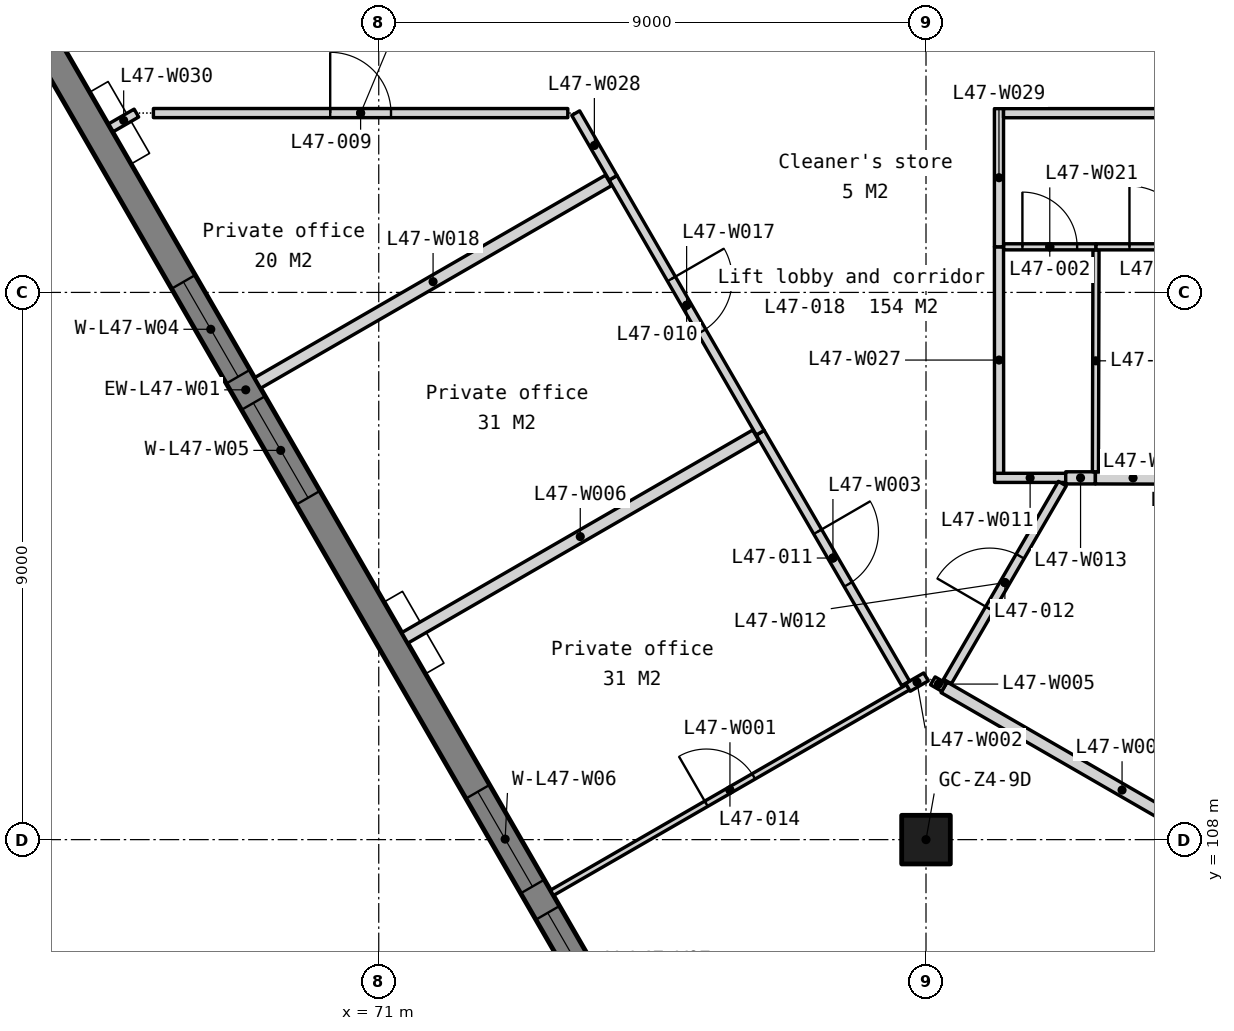
"""IFC4 building model, lengths in metres.
Left out: names, types, materials, properties, quantities, classifications, styles, units other than length and angle.
Written with IfcOpenShell. Run it as: python <this file> out.ifc"""

import sys

from ifc_helpers import new_model, si_unit, direction, frame, frame_2d, origin, origin_2d, place, context, subcontext, project, spatial, polyline, rectangle, outline, extrude, element, fill, save


model = new_model("IFC4")
c1 = context("Model", 3, precision=1e-05, world=origin(), true_north=direction((0.0, 1.0)))
c2 = subcontext(c1, "Body", "Model", "MODEL_VIEW")
j1 = project(units=[si_unit("LENGTHUNIT", "METRE"), si_unit("PLANEANGLEUNIT", "RADIAN")], contexts=[c1])
p1 = place(None, origin())
s1 = spatial("IfcSite", under=j1, at=p1, CompositionType="ELEMENT")
p2 = place(p1, origin())
s2 = spatial("IfcBuilding", under=s1, at=p2, CompositionType="ELEMENT")
p3 = place(p2, frame((0.0, 0.0, 188.0)))
s3 = spatial("IfcBuildingStorey", under=s2, at=p3, CompositionType="ELEMENT", Elevation=188.0)
p4 = place(p3, frame((80.0, 108.0, 0.0), z_axis=(0.0, 0.0, 1.0), x_axis=(1.0, 0.0, 0.0)))
e1 = element("IfcColumn", 1, at=p4, inside=s3, PredefinedType="COLUMN", context=c2, shape_type="SweptSolid", body=[
    extrude(rectangle(XDim=0.8, YDim=0.8, at=origin_2d()), origin(), (0.0, 0.0, 1.0), 3.9),
])
p5 = place(p3, frame((59.13, 132.168, -0.15), z_axis=(0.0, 0.0, 1.0), x_axis=(0.500002199942, -0.866024133644, 0.0)))
e2 = element("IfcWall", 2, at=p5, inside=s3, PredefinedType="SOLIDWALL", context=c2, shape_type="SweptSolid", body=[
    extrude(outline(polyline([(38.729, 0.0), (38.729, 3.9), (0.0, 3.9), (0.0, 0.0), (38.729, 0.0)])), frame((0.0, 0.225, 0.0), z_axis=(0.0, -1.0, 0.0), x_axis=(1.0, 0.0, 0.0)), (0.0, 0.0, 1.0), 0.45),
])
p6 = place(p5, frame((0.807, 0.0, 0.95)))
e3 = element("IfcOpeningElement", 3, at=p6, cuts=e2, PredefinedType="OPENING", context=c2, shape_type="SweptSolid", body=[
    extrude(rectangle(XDim=1.2, YDim=2.2, at=frame_2d((0.6, 1.1))), frame((0.0, 0.235, 0.0), z_axis=(0.0, -1.0, 0.0), x_axis=(1.0, 0.0, 0.0)), (0.0, 0.0, 1.0), 0.47),
])
p7 = place(p5, frame((7.632, 0.0, 0.95)))
e4 = element("IfcOpeningElement", 4, at=p7, cuts=e2, PredefinedType="OPENING", context=c2, shape_type="SweptSolid", body=[
    extrude(rectangle(XDim=1.8, YDim=2.2, at=frame_2d((0.9, 1.1))), frame((0.0, 0.235, 0.0), z_axis=(0.0, -1.0, 0.0), x_axis=(1.0, 0.0, 0.0)), (0.0, 0.0, 1.0), 0.47),
])
p8 = place(p5, frame((9.932, 0.0, 0.95)))
e5 = element("IfcOpeningElement", 5, at=p8, cuts=e2, PredefinedType="OPENING", context=c2, shape_type="SweptSolid", body=[
    extrude(rectangle(XDim=1.8, YDim=2.2, at=frame_2d((0.9, 1.1))), frame((0.0, 0.235, 0.0), z_axis=(0.0, -1.0, 0.0), x_axis=(1.0, 0.0, 0.0)), (0.0, 0.0, 1.0), 0.47),
])
p9 = place(p5, frame((17.315, 0.0, 0.95)))
e6 = element("IfcOpeningElement", 6, at=p9, cuts=e2, PredefinedType="OPENING", context=c2, shape_type="SweptSolid", body=[
    extrude(rectangle(XDim=1.8, YDim=2.2, at=frame_2d((0.9, 1.1))), frame((0.0, 0.235, 0.0), z_axis=(0.0, -1.0, 0.0), x_axis=(1.0, 0.0, 0.0)), (0.0, 0.0, 1.0), 0.47),
])
p10 = place(p5, frame((19.615, 0.0, 0.95)))
e7 = element("IfcOpeningElement", 7, at=p10, cuts=e2, PredefinedType="OPENING", context=c2, shape_type="SweptSolid", body=[
    extrude(rectangle(XDim=1.8, YDim=2.2, at=frame_2d((0.9, 1.1))), frame((0.0, 0.235, 0.0), z_axis=(0.0, -1.0, 0.0), x_axis=(1.0, 0.0, 0.0)), (0.0, 0.0, 1.0), 0.47),
])
p11 = place(p5, frame((26.997, 0.0, 0.95)))
e8 = element("IfcOpeningElement", 8, at=p11, cuts=e2, PredefinedType="OPENING", context=c2, shape_type="SweptSolid", body=[
    extrude(rectangle(XDim=1.8, YDim=2.2, at=frame_2d((0.9, 1.1))), frame((0.0, 0.235, 0.0), z_axis=(0.0, -1.0, 0.0), x_axis=(1.0, 0.0, 0.0)), (0.0, 0.0, 1.0), 0.47),
])
p12 = place(p5, frame((29.297, 0.0, 0.95)))
e9 = element("IfcOpeningElement", 9, at=p12, cuts=e2, PredefinedType="OPENING", context=c2, shape_type="SweptSolid", body=[
    extrude(rectangle(XDim=1.8, YDim=2.2, at=frame_2d((0.9, 1.1))), frame((0.0, 0.235, 0.0), z_axis=(0.0, -1.0, 0.0), x_axis=(1.0, 0.0, 0.0)), (0.0, 0.0, 1.0), 0.47),
])
p13 = place(p5, frame((36.722, 0.0, 0.95)))
e10 = element("IfcOpeningElement", 10, at=p13, cuts=e2, PredefinedType="OPENING", context=c2, shape_type="SweptSolid", body=[
    extrude(rectangle(XDim=1.2, YDim=2.2, at=frame_2d((0.6, 1.1))), frame((0.0, 0.235, 0.0), z_axis=(0.0, -1.0, 0.0), x_axis=(1.0, 0.0, 0.0)), (0.0, 0.0, 1.0), 0.47),
])
p14 = place(p3, frame((81.505, 98.627, -0.15), z_axis=(0.0, 0.0, 1.0), x_axis=(0.500002199942, 0.866024133644, 0.0)))
e11 = element("IfcWall", 11, at=p14, inside=s3, PredefinedType="SOLIDWALL", context=c2, shape_type="SweptSolid", body=[
    extrude(outline(polyline([(38.729, 0.0), (38.729, 3.9), (0.0, 3.9), (0.0, 0.0), (38.729, 0.0)])), frame((0.0, 0.225, 0.0), z_axis=(0.0, -1.0, 0.0), x_axis=(1.0, 0.0, 0.0)), (0.0, 0.0, 1.0), 0.45),
])
p15 = place(p14, frame((0.807, 0.0, 0.95)))
e12 = element("IfcOpeningElement", 12, at=p15, cuts=e11, PredefinedType="OPENING", context=c2, shape_type="SweptSolid", body=[
    extrude(rectangle(XDim=1.2, YDim=2.2, at=frame_2d((0.6, 1.1))), frame((0.0, 0.235, 0.0), z_axis=(0.0, -1.0, 0.0), x_axis=(1.0, 0.0, 0.0)), (0.0, 0.0, 1.0), 0.47),
])
p16 = place(p14, frame((7.632, 0.0, 0.95)))
e13 = element("IfcOpeningElement", 13, at=p16, cuts=e11, PredefinedType="OPENING", context=c2, shape_type="SweptSolid", body=[
    extrude(rectangle(XDim=1.8, YDim=2.2, at=frame_2d((0.9, 1.1))), frame((0.0, 0.235, 0.0), z_axis=(0.0, -1.0, 0.0), x_axis=(1.0, 0.0, 0.0)), (0.0, 0.0, 1.0), 0.47),
])
p17 = place(p14, frame((9.932, 0.0, 0.95)))
e14 = element("IfcOpeningElement", 14, at=p17, cuts=e11, PredefinedType="OPENING", context=c2, shape_type="SweptSolid", body=[
    extrude(rectangle(XDim=1.8, YDim=2.2, at=frame_2d((0.9, 1.1))), frame((0.0, 0.235, 0.0), z_axis=(0.0, -1.0, 0.0), x_axis=(1.0, 0.0, 0.0)), (0.0, 0.0, 1.0), 0.47),
])
p18 = place(p14, frame((17.315, 0.0, 0.95)))
e15 = element("IfcOpeningElement", 15, at=p18, cuts=e11, PredefinedType="OPENING", context=c2, shape_type="SweptSolid", body=[
    extrude(rectangle(XDim=1.8, YDim=2.2, at=frame_2d((0.9, 1.1))), frame((0.0, 0.235, 0.0), z_axis=(0.0, -1.0, 0.0), x_axis=(1.0, 0.0, 0.0)), (0.0, 0.0, 1.0), 0.47),
])
p19 = place(p14, frame((19.615, 0.0, 0.95)))
e16 = element("IfcOpeningElement", 16, at=p19, cuts=e11, PredefinedType="OPENING", context=c2, shape_type="SweptSolid", body=[
    extrude(rectangle(XDim=1.8, YDim=2.2, at=frame_2d((0.9, 1.1))), frame((0.0, 0.235, 0.0), z_axis=(0.0, -1.0, 0.0), x_axis=(1.0, 0.0, 0.0)), (0.0, 0.0, 1.0), 0.47),
])
p20 = place(p14, frame((26.997, 0.0, 0.95)))
e17 = element("IfcOpeningElement", 17, at=p20, cuts=e11, PredefinedType="OPENING", context=c2, shape_type="SweptSolid", body=[
    extrude(rectangle(XDim=1.8, YDim=2.2, at=frame_2d((0.9, 1.1))), frame((0.0, 0.235, 0.0), z_axis=(0.0, -1.0, 0.0), x_axis=(1.0, 0.0, 0.0)), (0.0, 0.0, 1.0), 0.47),
])
p21 = place(p14, frame((29.297, 0.0, 0.95)))
e18 = element("IfcOpeningElement", 18, at=p21, cuts=e11, PredefinedType="OPENING", context=c2, shape_type="SweptSolid", body=[
    extrude(rectangle(XDim=1.8, YDim=2.2, at=frame_2d((0.9, 1.1))), frame((0.0, 0.235, 0.0), z_axis=(0.0, -1.0, 0.0), x_axis=(1.0, 0.0, 0.0)), (0.0, 0.0, 1.0), 0.47),
])
p22 = place(p14, frame((36.722, 0.0, 0.95)))
e19 = element("IfcOpeningElement", 19, at=p22, cuts=e11, PredefinedType="OPENING", context=c2, shape_type="SweptSolid", body=[
    extrude(rectangle(XDim=1.2, YDim=2.2, at=frame_2d((0.6, 1.1))), frame((0.0, 0.235, 0.0), z_axis=(0.0, -1.0, 0.0), x_axis=(1.0, 0.0, 0.0)), (0.0, 0.0, 1.0), 0.47),
])
p23 = place(p3, frame((73.849, 107.125, 0.0), z_axis=(0.0, 0.0, 1.0), x_axis=(0.866029815523, 0.499992358568, 0.0)))
e20 = element("IfcWall", 20, at=p23, inside=s3, PredefinedType="PARTITIONING", context=c2, shape_type="SweptSolid", body=[
    extrude(rectangle(XDim=6.76, YDim=0.1, at=frame_2d((3.38, 0.0))), origin(), (0.0, 0.0, 1.0), 3.75),
])
p24 = place(p23, frame((2.93, 0.0, 0.0)))
e21 = element("IfcOpeningElement", 21, at=p24, cuts=e20, PredefinedType="OPENING", context=c2, shape_type="SweptSolid", body=[
    extrude(rectangle(XDim=0.9, YDim=2.1, at=frame_2d((0.45, 1.05))), frame((0.0, 0.06, 0.0), z_axis=(0.0, -1.0, 0.0), x_axis=(1.0, 0.0, 0.0)), (0.0, 0.0, 1.0), 0.12),
])
p25 = place(p3, frame((79.703, 110.505, 0.0), z_axis=(0.0, 0.0, 1.0), x_axis=(0.865913012852, 0.500194616298, 0.0)))
e22 = element("IfcWall", 22, at=p25, inside=s3, PredefinedType="PARTITIONING", context=c2, shape_type="SweptSolid", body=[
    extrude(rectangle(XDim=0.343, YDim=0.15, at=frame_2d((0.171, 0.0))), origin(), (0.0, 0.0, 1.0), 3.75),
])
p26 = place(p3, frame((77.274, 114.693, 0.0), z_axis=(0.0, 0.0, 1.0), x_axis=(0.501799348286, -0.864984054223, 0.0)))
e23 = element("IfcWall", 23, at=p26, inside=s3, PredefinedType="PARTITIONING", context=c2, shape_type="SweptSolid", body=[
    extrude(rectangle(XDim=4.766, YDim=0.15, at=frame_2d((2.383, 0.0))), origin(), (0.0, 0.0, 1.0), 3.75),
])
p27 = place(p26, frame((1.883, 0.0, 0.0)))
e24 = element("IfcOpeningElement", 24, at=p27, cuts=e23, PredefinedType="OPENING", context=c2, shape_type="SweptSolid", body=[
    extrude(rectangle(XDim=1.0, YDim=2.1, at=frame_2d((0.5, 1.05))), frame((0.0, 0.085, 0.0), z_axis=(0.0, -1.0, 0.0), x_axis=(1.0, 0.0, 0.0)), (0.0, 0.0, 1.0), 0.17),
])
p28 = place(p3, frame((80.297, 110.505, 0.0), z_axis=(0.0, 0.0, 1.0), x_axis=(0.866029815523, -0.499992358568, 0.0)))
e25 = element("IfcWall", 25, at=p28, inside=s3, PredefinedType="PARTITIONING", context=c2, shape_type="SweptSolid", body=[
    extrude(rectangle(XDim=6.76, YDim=0.2, at=frame_2d((3.38, 0.0))), origin(), (0.0, 0.0, 1.0), 3.75),
])
p29 = place(p3, frame((80.113, 110.612, 0.0), z_axis=(0.0, 0.0, 1.0), x_axis=(0.865765842911, -0.500449303376, 0.0)))
e26 = element("IfcWall", 26, at=p29, inside=s3, PredefinedType="PARTITIONING", context=c2, shape_type="SweptSolid", body=[
    extrude(rectangle(XDim=0.213, YDim=0.15, at=frame_2d((0.106, 0.0))), origin(), (0.0, 0.0, 1.0), 3.75),
])
p30 = place(p3, frame((71.428, 111.318, 0.0), z_axis=(0.0, 0.0, 1.0), x_axis=(0.866020884234, 0.500007828009, 0.0)))
e27 = element("IfcWall", 27, at=p30, inside=s3, PredefinedType="PARTITIONING", context=c2, shape_type="SweptSolid", body=[
    extrude(rectangle(XDim=6.665, YDim=0.2, at=frame_2d((3.333, 0.0))), origin(), (0.0, 0.0, 1.0), 3.75),
])
p31 = place(p3, frame((81.127, 113.95, 0.0), z_axis=(0.0, 0.0, 1.0), x_axis=(1.0, 0.0, 0.0)))
e28 = element("IfcWall", 28, at=p31, inside=s3, PredefinedType="PARTITIONING", context=c2, shape_type="SweptSolid", body=[
    extrude(rectangle(XDim=1.17, YDim=0.15, at=frame_2d((0.585, 0.0))), origin(), (0.0, 0.0, 1.0), 3.75),
])
p32 = place(p3, frame((80.352, 110.6, 0.0), z_axis=(0.0, 0.0, 1.0), x_axis=(0.502155861577, 0.864777133534, 0.0)))
e29 = element("IfcWall", 29, at=p32, inside=s3, PredefinedType="PARTITIONING", context=c2, shape_type="SweptSolid", body=[
    extrude(rectangle(XDim=3.764, YDim=0.15, at=frame_2d((1.882, 0.0))), origin(), (0.0, 0.0, 1.0), 3.75),
])
p33 = place(p32, frame((1.382, 0.0, 0.0)))
e30 = element("IfcOpeningElement", 30, at=p33, cuts=e29, PredefinedType="OPENING", context=c2, shape_type="SweptSolid", body=[
    extrude(rectangle(XDim=1.0, YDim=2.1, at=frame_2d((0.5, 1.05))), frame((0.0, 0.085, 0.0), z_axis=(0.0, -1.0, 0.0), x_axis=(1.0, 0.0, 0.0)), (0.0, 0.0, 1.0), 0.17),
])
p34 = place(p3, frame((82.297, 113.95, 0.0), z_axis=(0.0, 0.0, 1.0), x_axis=(1.0, 0.0, 0.0)))
e31 = element("IfcWall", 31, at=p34, inside=s3, PredefinedType="PARTITIONING", context=c2, shape_type="SweptSolid", body=[
    extrude(rectangle(XDim=0.489, YDim=0.2, at=frame_2d((0.244, 0.0))), origin(), (0.0, 0.0, 1.0), 3.75),
])
p35 = place(p3, frame((82.786, 113.95, 0.0), z_axis=(0.0, 0.0, 1.0), x_axis=(0.999997200094, -0.002366390535, 0.0)))
e32 = element("IfcWall", 32, at=p35, inside=s3, PredefinedType="PARTITIONING", context=c2, shape_type="SweptSolid", body=[
    extrude(rectangle(XDim=1.238, YDim=0.2, at=frame_2d((0.619, 0.0))), origin(), (0.0, 0.0, 1.0), 3.75),
])
p36 = place(p3, frame((74.853, 118.885, 0.0), z_axis=(0.0, 0.0, 1.0), x_axis=(0.500006196252, -0.866021826347, 0.0)))
e33 = element("IfcWall", 33, at=p36, inside=s3, PredefinedType="PARTITIONING", context=c2, shape_type="SweptSolid", body=[
    extrude(rectangle(XDim=4.841, YDim=0.15, at=frame_2d((2.421, 0.0))), origin(), (0.0, 0.0, 1.0), 3.75),
])
p37 = place(p36, frame((1.921, 0.0, 0.0)))
e34 = element("IfcOpeningElement", 34, at=p37, cuts=e33, PredefinedType="OPENING", context=c2, shape_type="SweptSolid", body=[
    extrude(rectangle(XDim=1.0, YDim=2.1, at=frame_2d((0.5, 1.05))), frame((0.0, 0.085, 0.0), z_axis=(0.0, -1.0, 0.0), x_axis=(1.0, 0.0, 0.0)), (0.0, 0.0, 1.0), 0.17),
])
p38 = place(p3, frame((69.007, 115.51, 0.0), z_axis=(0.0, 0.0, 1.0), x_axis=(0.866030041738, 0.499991966744, 0.0)))
e35 = element("IfcWall", 35, at=p38, inside=s3, PredefinedType="PARTITIONING", context=c2, shape_type="SweptSolid", body=[
    extrude(rectangle(XDim=6.665, YDim=0.2, at=frame_2d((3.333, 0.0))), origin(), (0.0, 0.0, 1.0), 3.75),
])
p39 = place(p3, frame((82.786, 114.05, 0.0), z_axis=(0.0, 0.0, 1.0), x_axis=(0.002608686776, 0.999996597371, 0.0)))
e36 = element("IfcWall", 36, at=p39, inside=s3, PredefinedType="PARTITIONING", context=c2, shape_type="SweptSolid", body=[
    extrude(rectangle(XDim=3.65, YDim=0.1, at=frame_2d((1.825, 0.0))), origin(), (0.0, 0.0, 1.0), 3.75),
])
p40 = place(p3, frame((81.275, 117.75, 0.0), z_axis=(0.0, 0.0, 1.0), x_axis=(1.0, 0.0, 0.0)))
e37 = element("IfcWall", 37, at=p40, inside=s3, PredefinedType="PARTITIONING", context=c2, shape_type="SweptSolid", body=[
    extrude(rectangle(XDim=1.521, YDim=0.1, at=frame_2d((0.76, 0.0))), origin(), (0.0, 0.0, 1.0), 3.75),
])
p41 = place(p40, frame((0.311, 0.0, 0.0)))
e38 = element("IfcOpeningElement", 38, at=p41, cuts=e37, PredefinedType="OPENING", context=c2, shape_type="SweptSolid", body=[
    extrude(rectangle(XDim=0.9, YDim=2.1, at=frame_2d((0.45, 1.05))), frame((0.0, 0.06, 0.0), z_axis=(0.0, -1.0, 0.0), x_axis=(1.0, 0.0, 0.0)), (0.0, 0.0, 1.0), 0.12),
])
p42 = place(p3, frame((82.796, 117.75, 0.0), z_axis=(0.0, 0.0, 1.0), x_axis=(1.0, 0.0, 0.0)))
e39 = element("IfcWall", 39, at=p42, inside=s3, PredefinedType="PARTITIONING", context=c2, shape_type="SweptSolid", body=[
    extrude(rectangle(XDim=2.1, YDim=0.1, at=frame_2d((1.05, 0.0))), origin(), (0.0, 0.0, 1.0), 3.75),
])
p43 = place(p42, frame((0.55, 0.0, 0.0)))
e40 = element("IfcOpeningElement", 40, at=p43, cuts=e39, PredefinedType="OPENING", context=c2, shape_type="SweptSolid", body=[
    extrude(rectangle(XDim=1.0, YDim=2.1, at=frame_2d((0.5, 1.05))), frame((0.0, 0.06, 0.0), z_axis=(0.0, -1.0, 0.0), x_axis=(1.0, 0.0, 0.0)), (0.0, 0.0, 1.0), 0.12),
])
p44 = place(p3, frame((81.202, 114.025, 0.0), z_axis=(0.0, 0.0, 1.0), x_axis=(-0.000524315041, 0.999999862547, 0.0)))
e41 = element("IfcWall", 41, at=p44, inside=s3, PredefinedType="PARTITIONING", context=c2, shape_type="SweptSolid", body=[
    extrude(rectangle(XDim=3.725, YDim=0.15, at=frame_2d((1.863, 0.0))), origin(), (0.0, 0.0, 1.0), 3.75),
])
p45 = place(p3, frame((74.239, 119.949, 0.0), z_axis=(0.0, 0.0, 1.0), x_axis=(0.499923202248, -0.866069738447, 0.0)))
e42 = element("IfcWall", 42, at=p45, inside=s3, PredefinedType="PARTITIONING", context=c2, shape_type="SweptSolid", body=[
    extrude(rectangle(XDim=1.228, YDim=0.15, at=frame_2d((0.614, 0.0))), origin(), (0.0, 0.0, 1.0), 3.75),
])
p46 = place(p3, frame((81.2, 117.75, 0.0), z_axis=(0.0, 0.0, 1.0), x_axis=(0.0, 1.0, 0.0)))
e43 = element("IfcWall", 43, at=p46, inside=s3, PredefinedType="PARTITIONING", context=c2, shape_type="SweptSolid", body=[
    extrude(rectangle(XDim=2.273, YDim=0.15, at=frame_2d((1.136, 0.0))), origin(), (0.0, 0.0, 1.0), 3.75),
])
p47 = place(p3, frame((66.595, 119.708, 0.0), z_axis=(0.0, 0.0, 1.0), x_axis=(0.865967067452, 0.500101027882, 0.0)))
e44 = element("IfcWall", 44, at=p47, inside=s3, PredefinedType="PARTITIONING", context=c2, shape_type="SweptSolid", body=[
    extrude(rectangle(XDim=0.484, YDim=0.15, at=frame_2d((0.242, 0.0))), origin(), (0.0, 0.0, 1.0), 3.75),
])
p48 = place(p3, frame((67.294, 119.95, 0.0), z_axis=(0.0, 0.0, 1.0), x_axis=(0.999999994225, -0.000107472952, 0.0)))
e45 = element("IfcWall", 45, at=p48, inside=s3, PredefinedType="PARTITIONING", context=c2, shape_type="SweptSolid", body=[
    extrude(rectangle(XDim=6.815, YDim=0.15, at=frame_2d((3.407, 0.0))), origin(), (0.0, 0.0, 1.0), 3.75),
])
p49 = place(p48, frame((2.907, 0.0, 0.0)))
e46 = element("IfcOpeningElement", 46, at=p49, cuts=e45, PredefinedType="OPENING", context=c2, shape_type="SweptSolid", body=[
    extrude(rectangle(XDim=1.0, YDim=2.1, at=frame_2d((0.5, 1.05))), frame((0.0, 0.085, 0.0), z_axis=(0.0, -1.0, 0.0), x_axis=(1.0, 0.0, 0.0)), (0.0, 0.0, 1.0), 0.17),
])
p50 = place(p3, frame((81.275, 119.948, 0.0), z_axis=(0.0, 0.0, 1.0), x_axis=(1.0, 0.0, 0.0)))
e47 = element("IfcWall", 47, at=p50, inside=s3, PredefinedType="PARTITIONING", context=c2, shape_type="SweptSolid", body=[
    extrude(rectangle(XDim=8.25, YDim=0.15, at=frame_2d((4.125, 0.0))), origin(), (0.0, 0.0, 1.0), 3.75),
])
p51 = place(p50, frame((3.625, 0.0, 0.0)))
e48 = element("IfcOpeningElement", 48, at=p51, cuts=e47, PredefinedType="OPENING", context=c2, shape_type="SweptSolid", body=[
    extrude(rectangle(XDim=1.0, YDim=2.1, at=frame_2d((0.5, 1.05))), frame((0.0, 0.085, 0.0), z_axis=(0.0, -1.0, 0.0), x_axis=(1.0, 0.0, 0.0)), (0.0, 0.0, 1.0), 0.17),
])
p52 = place(p9, origin())
e49 = element("IfcWindow", 49, at=p52, inside=s3, PartitioningType="SINGLE_PANEL", PredefinedType="WINDOW", context=c2, shape_type="SweptSolid", body=[
    extrude(rectangle(XDim=1.8, YDim=2.2, at=frame_2d((0.9, 1.1))), frame((0.0, 0.03, 0.0), z_axis=(0.0, -1.0, 0.0), x_axis=(1.0, 0.0, 0.0)), (0.0, 0.0, 1.0), 0.06),
])
fill(e6, e49)
p53 = place(p10, origin())
e50 = element("IfcWindow", 50, at=p53, inside=s3, PartitioningType="SINGLE_PANEL", PredefinedType="WINDOW", context=c2, shape_type="SweptSolid", body=[
    extrude(rectangle(XDim=1.8, YDim=2.2, at=frame_2d((0.9, 1.1))), frame((0.0, 0.03, 0.0), z_axis=(0.0, -1.0, 0.0), x_axis=(1.0, 0.0, 0.0)), (0.0, 0.0, 1.0), 0.06),
])
fill(e7, e50)
p54 = place(p11, origin())
e51 = element("IfcWindow", 51, at=p54, inside=s3, PartitioningType="SINGLE_PANEL", PredefinedType="WINDOW", context=c2, shape_type="SweptSolid", body=[
    extrude(rectangle(XDim=1.8, YDim=2.2, at=frame_2d((0.9, 1.1))), frame((0.0, 0.03, 0.0), z_axis=(0.0, -1.0, 0.0), x_axis=(1.0, 0.0, 0.0)), (0.0, 0.0, 1.0), 0.06),
])
fill(e8, e51)
p55 = place(p12, origin())
e52 = element("IfcWindow", 52, at=p55, inside=s3, PartitioningType="SINGLE_PANEL", PredefinedType="WINDOW", context=c2, shape_type="SweptSolid", body=[
    extrude(rectangle(XDim=1.8, YDim=2.2, at=frame_2d((0.9, 1.1))), frame((0.0, 0.03, 0.0), z_axis=(0.0, -1.0, 0.0), x_axis=(1.0, 0.0, 0.0)), (0.0, 0.0, 1.0), 0.06),
])
fill(e9, e52)
p56 = place(p41, origin())
e53 = element("IfcDoor", 53, at=p56, inside=s3, OperationType="SINGLE_SWING_LEFT", PredefinedType="DOOR", context=c2, shape_type="SweptSolid", body=[
    extrude(rectangle(XDim=0.9, YDim=2.1, at=frame_2d((0.45, 1.05))), frame((0.0, 0.025, 0.0), z_axis=(0.0, -1.0, 0.0), x_axis=(1.0, 0.0, 0.0)), (0.0, 0.0, 1.0), 0.05),
])
fill(e38, e53)
p57 = place(p43, origin())
e54 = element("IfcDoor", 54, at=p57, inside=s3, OperationType="SINGLE_SWING_LEFT", PredefinedType="DOOR", context=c2, shape_type="SweptSolid", body=[
    extrude(rectangle(XDim=1.0, YDim=2.1, at=frame_2d((0.5, 1.05))), frame((0.0, 0.025, 0.0), z_axis=(0.0, -1.0, 0.0), x_axis=(1.0, 0.0, 0.0)), (0.0, 0.0, 1.0), 0.05),
])
fill(e40, e54)
p58 = place(p49, origin())
e55 = element("IfcDoor", 55, at=p58, inside=s3, OperationType="SINGLE_SWING_LEFT", PredefinedType="DOOR", context=c2, shape_type="SweptSolid", body=[
    extrude(rectangle(XDim=1.0, YDim=2.1, at=frame_2d((0.5, 1.05))), frame((0.0, 0.025, 0.0), z_axis=(0.0, -1.0, 0.0), x_axis=(1.0, 0.0, 0.0)), (0.0, 0.0, 1.0), 0.05),
])
fill(e46, e55)
p59 = place(p37, origin())
e56 = element("IfcDoor", 56, at=p59, inside=s3, OperationType="SINGLE_SWING_LEFT", PredefinedType="DOOR", context=c2, shape_type="SweptSolid", body=[
    extrude(rectangle(XDim=1.0, YDim=2.1, at=frame_2d((0.5, 1.05))), frame((0.0, 0.025, 0.0), z_axis=(0.0, -1.0, 0.0), x_axis=(1.0, 0.0, 0.0)), (0.0, 0.0, 1.0), 0.05),
])
fill(e34, e56)
p60 = place(p27, origin())
e57 = element("IfcDoor", 57, at=p60, inside=s3, OperationType="SINGLE_SWING_LEFT", PredefinedType="DOOR", context=c2, shape_type="SweptSolid", body=[
    extrude(rectangle(XDim=1.0, YDim=2.1, at=frame_2d((0.5, 1.05))), frame((0.0, 0.025, 0.0), z_axis=(0.0, -1.0, 0.0), x_axis=(1.0, 0.0, 0.0)), (0.0, 0.0, 1.0), 0.05),
])
fill(e24, e57)
p61 = place(p33, origin())
e58 = element("IfcDoor", 58, at=p61, inside=s3, OperationType="SINGLE_SWING_LEFT", PredefinedType="DOOR", context=c2, shape_type="SweptSolid", body=[
    extrude(rectangle(XDim=1.0, YDim=2.1, at=frame_2d((0.5, 1.05))), frame((0.0, 0.025, 0.0), z_axis=(0.0, -1.0, 0.0), x_axis=(1.0, 0.0, 0.0)), (0.0, 0.0, 1.0), 0.05),
])
fill(e30, e58)
p62 = place(p24, origin())
e59 = element("IfcDoor", 59, at=p62, inside=s3, OperationType="SINGLE_SWING_LEFT", PredefinedType="DOOR", context=c2, shape_type="SweptSolid", body=[
    extrude(rectangle(XDim=0.9, YDim=2.1, at=frame_2d((0.45, 1.05))), frame((0.0, 0.025, 0.0), z_axis=(0.0, -1.0, 0.0), x_axis=(1.0, 0.0, 0.0)), (0.0, 0.0, 1.0), 0.05),
])
fill(e21, e59)
save(model, sys.argv[1])
